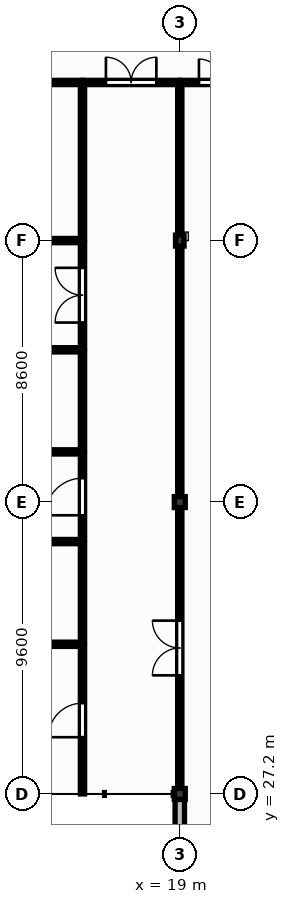
"""IFC4 building model, lengths in metres.
Left out: names, types, materials, properties, quantities, classifications, styles, units other than length and angle.
Written with IfcOpenShell. Run it as: python <this file> out.ifc"""

import sys

from ifc_helpers import new_model, si_unit, direction, frame, frame_2d, origin, origin_2d, place, context, subcontext, project, spatial, rectangle, extrude, element, fill, save


model = new_model("IFC4")
c1 = context("Model", 3, precision=1e-05, world=origin(), true_north=direction((0.0, 1.0)))
c2 = subcontext(c1, "Body", "Model", "MODEL_VIEW")
j1 = project(units=[si_unit("LENGTHUNIT", "METRE"), si_unit("PLANEANGLEUNIT", "RADIAN")], contexts=[c1])
p1 = place(None, origin())
s1 = spatial("IfcSite", under=j1, at=p1, CompositionType="ELEMENT")
p2 = place(p1, origin())
s2 = spatial("IfcBuilding", under=s1, at=p2, CompositionType="ELEMENT")
p3 = place(p2, frame((0.0, 0.0, 9.0)))
s3 = spatial("IfcBuildingStorey", under=s2, at=p3, CompositionType="ELEMENT", Elevation=9.0)
for number, where, z_axis, x_axis in (
    (1, (19.0, 27.2, 0.0), (0.0, 0.0, 1.0), (1.0, 0.0, 0.0)),
    (2, (19.0, 36.8, 0.0), (0.0, 0.0, 1.0), (1.0, 0.0, 0.0)),
):
    element("IfcColumn", number, at=place(p3, frame(where, z_axis=z_axis, x_axis=x_axis)), inside=s3, PredefinedType="COLUMN", context=c2, shape_type="SweptSolid", body=[
        extrude(rectangle(XDim=0.36, YDim=0.36, at=origin_2d()), origin(), (0.0, 0.0, 1.0), 3.95),
    ])
p4 = place(p3, frame((19.0, 45.4, 0.0), z_axis=(0.0, 0.0, 1.0), x_axis=(1.0, 0.0, 0.0)))
e3 = element("IfcColumn", 3, at=p4, inside=s3, PredefinedType="COLUMN", context=c2, shape_type="SweptSolid", body=[
    extrude(rectangle(XDim=0.28, YDim=0.36, at=origin_2d()), origin(), (0.0, 0.0, 1.0), 3.95),
])
p5 = place(p3, frame((19.0, 18.76, 0.0), z_axis=(0.0, 0.0, 1.0), x_axis=(0.0, 1.0, 0.0)))
e4 = element("IfcWall", 4, at=p5, inside=s3, PredefinedType="SOLIDWALL", context=c2, shape_type="SweptSolid", body=[
    extrude(rectangle(XDim=8.26, YDim=0.31, at=frame_2d((4.13, 0.0))), origin(), (0.0, 0.0, 1.0), 3.49),
])
p6 = place(p5, frame((2.54, 0.0, 1.35)))
e5 = element("IfcOpeningElement", 5, at=p6, cuts=e4, PredefinedType="OPENING", context=c2, shape_type="SweptSolid", body=[
    extrude(rectangle(XDim=1.25, YDim=1.4, at=frame_2d((0.625, 0.7))), frame((0.0, 0.165, 0.0), z_axis=(0.0, -1.0, 0.0), x_axis=(1.0, 0.0, 0.0)), (0.0, 0.0, 1.0), 0.33),
])
p7 = place(p5, frame((4.47, 0.0, 1.35)))
e6 = element("IfcOpeningElement", 6, at=p7, cuts=e4, PredefinedType="OPENING", context=c2, shape_type="SweptSolid", body=[
    extrude(rectangle(XDim=1.25, YDim=1.4, at=frame_2d((0.625, 0.7))), frame((0.0, 0.165, 0.0), z_axis=(0.0, -1.0, 0.0), x_axis=(1.0, 0.0, 0.0)), (0.0, 0.0, 1.0), 0.33),
])
p8 = place(p3, frame((11.8, 32.122, 0.0), z_axis=(0.0, 0.0, 1.0), x_axis=(1.0, 0.0, 0.0)))
e7 = element("IfcWall", 7, at=p8, inside=s3, PredefinedType="PARTITIONING", context=c2, shape_type="SweptSolid", body=[
    extrude(rectangle(XDim=4.0, YDim=0.14, at=frame_2d((2.0, 0.0))), origin(), (0.0, 0.0, 1.0), 3.96),
])
p9 = place(p3, frame((11.8, 35.5, 0.0), z_axis=(0.0, 0.0, 1.0), x_axis=(1.0, 0.0, 0.0)))
e8 = element("IfcWall", 8, at=p9, inside=s3, PredefinedType="PARTITIONING", context=c2, shape_type="SweptSolid", body=[
    extrude(rectangle(XDim=4.0, YDim=0.14, at=frame_2d((2.0, 0.0))), origin(), (0.0, 0.0, 1.0), 3.96),
])
p10 = place(p9, frame((1.54, 0.0, 0.0)))
e9 = element("IfcOpeningElement", 9, at=p10, cuts=e8, PredefinedType="OPENING", context=c2, shape_type="SweptSolid", body=[
    extrude(rectangle(XDim=0.92, YDim=2.1, at=frame_2d((0.46, 1.05))), frame((0.0, 0.08, 0.0), z_axis=(0.0, -1.0, 0.0), x_axis=(1.0, 0.0, 0.0)), (0.0, 0.0, 1.0), 0.16),
])
p11 = place(p3, frame((11.8, 38.45, 0.0), z_axis=(0.0, 0.0, 1.0), x_axis=(1.0, 0.0, 0.0)))
e10 = element("IfcWall", 10, at=p11, inside=s3, PredefinedType="PARTITIONING", context=c2, shape_type="SweptSolid", body=[
    extrude(rectangle(XDim=4.0, YDim=0.14, at=frame_2d((2.0, 0.0))), origin(), (0.0, 0.0, 1.0), 3.96),
])
p12 = place(p11, frame((1.42, 0.0, 0.0)))
e11 = element("IfcOpeningElement", 11, at=p12, cuts=e10, PredefinedType="OPENING", context=c2, shape_type="SweptSolid", body=[
    extrude(rectangle(XDim=1.16, YDim=2.1, at=frame_2d((0.58, 1.05))), frame((0.0, 0.08, 0.0), z_axis=(0.0, -1.0, 0.0), x_axis=(1.0, 0.0, 0.0)), (0.0, 0.0, 1.0), 0.16),
])
p13 = place(p3, frame((11.8, 41.807, 0.0), z_axis=(0.0, 0.0, 1.0), x_axis=(1.0, 0.0, 0.0)))
e12 = element("IfcWall", 12, at=p13, inside=s3, PredefinedType="PARTITIONING", context=c2, shape_type="SweptSolid", body=[
    extrude(rectangle(XDim=4.0, YDim=0.14, at=frame_2d((2.0, 0.0))), origin(), (0.0, 0.0, 1.0), 3.96),
])
p14 = place(p3, frame((11.96, 45.4, 0.0), z_axis=(0.0, 0.0, 1.0), x_axis=(1.0, 0.0, 0.0)))
e13 = element("IfcWall", 13, at=p14, inside=s3, PredefinedType="PARTITIONING", context=c2, shape_type="SweptSolid", body=[
    extrude(rectangle(XDim=3.84, YDim=0.14, at=frame_2d((1.92, 0.0))), origin(), (0.0, 0.0, 1.0), 3.31),
])
p15 = place(p3, frame((11.8, 50.6, 0.0), z_axis=(0.0, 0.0, 1.0), x_axis=(1.0, 0.0, 0.0)))
e14 = element("IfcWall", 14, at=p15, inside=s3, PredefinedType="PARTITIONING", context=c2, shape_type="SweptSolid", body=[
    extrude(rectangle(XDim=4.0, YDim=0.14, at=frame_2d((2.0, 0.0))), origin(), (0.0, 0.0, 1.0), 3.96),
])
p16 = place(p15, frame((1.48, 0.0, 0.0)))
e15 = element("IfcOpeningElement", 15, at=p16, cuts=e14, PredefinedType="OPENING", context=c2, shape_type="SweptSolid", body=[
    extrude(rectangle(XDim=1.04, YDim=2.1, at=frame_2d((0.52, 1.05))), frame((0.0, 0.08, 0.0), z_axis=(0.0, -1.0, 0.0), x_axis=(1.0, 0.0, 0.0)), (0.0, 0.0, 1.0), 0.16),
])
p17 = place(p3, frame((15.8, 27.2, 0.0), z_axis=(0.0, 0.0, 1.0), x_axis=(0.0, 1.0, 0.0)))
e16 = element("IfcWall", 16, at=p17, inside=s3, PredefinedType="PARTITIONING", context=c2, shape_type="SweptSolid", body=[
    extrude(rectangle(XDim=4.852, YDim=0.14, at=frame_2d((2.426, 0.0))), origin(), (0.0, 0.0, 1.0), 3.96),
])
p18 = place(p17, frame((1.866, 0.0, 0.0)))
e17 = element("IfcOpeningElement", 17, at=p18, cuts=e16, PredefinedType="OPENING", context=c2, shape_type="SweptSolid", body=[
    extrude(rectangle(XDim=1.12, YDim=2.15, at=frame_2d((0.56, 1.075))), frame((0.0, 0.08, 0.0), z_axis=(0.0, -1.0, 0.0), x_axis=(1.0, 0.0, 0.0)), (0.0, 0.0, 1.0), 0.16),
])
p19 = place(p3, frame((15.8, 32.192, 0.0), z_axis=(0.0, 0.0, 1.0), x_axis=(0.0, 1.0, 0.0)))
e18 = element("IfcWall", 18, at=p19, inside=s3, PredefinedType="PARTITIONING", context=c2, shape_type="SweptSolid", body=[
    extrude(rectangle(XDim=3.238, YDim=0.14, at=frame_2d((1.619, 0.0))), origin(), (0.0, 0.0, 1.0), 3.96),
])
p20 = place(p3, frame((15.8, 35.57, 0.0), z_axis=(0.0, 0.0, 1.0), x_axis=(0.0, 1.0, 0.0)))
e19 = element("IfcWall", 19, at=p20, inside=s3, PredefinedType="PARTITIONING", context=c2, shape_type="SweptSolid", body=[
    extrude(rectangle(XDim=2.81, YDim=0.14, at=frame_2d((1.405, 0.0))), origin(), (0.0, 0.0, 1.0), 3.96),
])
p21 = place(p20, frame((0.795, 0.0, 0.0)))
e20 = element("IfcOpeningElement", 20, at=p21, cuts=e19, PredefinedType="OPENING", context=c2, shape_type="SweptSolid", body=[
    extrude(rectangle(XDim=1.22, YDim=2.1, at=frame_2d((0.61, 1.05))), frame((0.0, 0.08, 0.0), z_axis=(0.0, -1.0, 0.0), x_axis=(1.0, 0.0, 0.0)), (0.0, 0.0, 1.0), 0.16),
])
p22 = place(p3, frame((15.8, 38.52, 0.0), z_axis=(0.0, 0.0, 1.0), x_axis=(0.0, 1.0, 0.0)))
e21 = element("IfcWall", 21, at=p22, inside=s3, PredefinedType="PARTITIONING", context=c2, shape_type="SweptSolid", body=[
    extrude(rectangle(XDim=3.217, YDim=0.14, at=frame_2d((1.608, 0.0))), origin(), (0.0, 0.0, 1.0), 3.96),
])
p23 = place(p3, frame((15.8, 41.877, 0.0), z_axis=(0.0, 0.0, 1.0), x_axis=(0.0, 1.0, 0.0)))
e22 = element("IfcWall", 22, at=p23, inside=s3, PredefinedType="PARTITIONING", context=c2, shape_type="SweptSolid", body=[
    extrude(rectangle(XDim=3.453, YDim=0.14, at=frame_2d((1.727, 0.0))), origin(), (0.0, 0.0, 1.0), 3.96),
])
p24 = place(p23, frame((0.826, 0.0, 0.0)))
e23 = element("IfcOpeningElement", 23, at=p24, cuts=e22, PredefinedType="OPENING", context=c2, shape_type="SweptSolid", body=[
    extrude(rectangle(XDim=1.8, YDim=2.3, at=frame_2d((0.9, 1.15))), frame((0.0, 0.08, 0.0), z_axis=(0.0, -1.0, 0.0), x_axis=(1.0, 0.0, 0.0)), (0.0, 0.0, 1.0), 0.16),
])
p25 = place(p3, frame((15.8, 45.47, 0.0), z_axis=(0.0, 0.0, 1.0), x_axis=(0.0, 1.0, 0.0)))
e24 = element("IfcWall", 24, at=p25, inside=s3, PredefinedType="PARTITIONING", context=c2, shape_type="SweptSolid", body=[
    extrude(rectangle(XDim=5.06, YDim=0.14, at=frame_2d((2.53, 0.0))), origin(), (0.0, 0.0, 1.0), 3.96),
])
p26 = place(p3, frame((15.8, 50.6, 0.0), z_axis=(0.0, 0.0, 1.0), x_axis=(1.0, 0.0, 0.0)))
e25 = element("IfcWall", 25, at=p26, inside=s3, PredefinedType="PARTITIONING", context=c2, shape_type="SweptSolid", body=[
    extrude(rectangle(XDim=3.2, YDim=0.14, at=frame_2d((1.6, 0.0))), origin(), (0.0, 0.0, 1.0), 3.96),
])
p27 = place(p26, frame((0.77, 0.0, 0.0)))
e26 = element("IfcOpeningElement", 26, at=p27, cuts=e25, PredefinedType="OPENING", context=c2, shape_type="SweptSolid", body=[
    extrude(rectangle(XDim=1.66, YDim=2.3, at=frame_2d((0.83, 1.15))), frame((0.0, 0.08, 0.0), z_axis=(0.0, -1.0, 0.0), x_axis=(1.0, 0.0, 0.0)), (0.0, 0.0, 1.0), 0.16),
])
p28 = place(p3, frame((19.0, 27.38, 0.0), z_axis=(0.0, 0.0, 1.0), x_axis=(0.0, 1.0, 0.0)))
e27 = element("IfcWall", 27, at=p28, inside=s3, PredefinedType="PARTITIONING", context=c2, shape_type="SweptSolid", body=[
    extrude(rectangle(XDim=9.24, YDim=0.14, at=frame_2d((4.62, 0.0))), origin(), (0.0, 0.0, 1.0), 3.49),
])
p29 = place(p28, frame((3.72, 0.0, 0.0)))
e28 = element("IfcOpeningElement", 28, at=p29, cuts=e27, PredefinedType="OPENING", context=c2, shape_type="SweptSolid", body=[
    extrude(rectangle(XDim=1.8, YDim=2.3, at=frame_2d((0.9, 1.15))), frame((0.0, 0.08, 0.0), z_axis=(0.0, -1.0, 0.0), x_axis=(1.0, 0.0, 0.0)), (0.0, 0.0, 1.0), 0.16),
])
p30 = place(p3, frame((19.0, 36.98, 0.0), z_axis=(0.0, 0.0, 1.0), x_axis=(0.0, 1.0, 0.0)))
e29 = element("IfcWall", 29, at=p30, inside=s3, PredefinedType="PARTITIONING", context=c2, shape_type="SweptSolid", body=[
    extrude(rectangle(XDim=8.24, YDim=0.14, at=frame_2d((4.12, 0.0))), origin(), (0.0, 0.0, 1.0), 3.49),
])
p31 = place(p3, frame((19.0, 45.58, 0.0), z_axis=(0.0, 0.0, 1.0), x_axis=(0.0, 1.0, 0.0)))
e30 = element("IfcWall", 30, at=p31, inside=s3, PredefinedType="PARTITIONING", context=c2, shape_type="SweptSolid", body=[
    extrude(rectangle(XDim=4.95, YDim=0.14, at=frame_2d((2.475, 0.0))), origin(), (0.0, 0.0, 1.0), 3.43),
])
p32 = place(p3, frame((19.0, 50.6, 0.0), z_axis=(0.0, 0.0, 1.0), x_axis=(1.0, 0.0, 0.0)))
e31 = element("IfcWall", 31, at=p32, inside=s3, PredefinedType="PARTITIONING", context=c2, shape_type="SweptSolid", body=[
    extrude(rectangle(XDim=2.8, YDim=0.14, at=frame_2d((1.4, 0.0))), origin(), (0.0, 0.0, 1.0), 3.96),
])
p33 = place(p32, frame((0.63, 0.0, 0.0)))
e32 = element("IfcOpeningElement", 32, at=p33, cuts=e31, PredefinedType="OPENING", context=c2, shape_type="SweptSolid", body=[
    extrude(rectangle(XDim=1.54, YDim=2.25, at=frame_2d((0.77, 1.125))), frame((0.0, 0.08, 0.0), z_axis=(0.0, -1.0, 0.0), x_axis=(1.0, 0.0, 0.0)), (0.0, 0.0, 1.0), 0.16),
])
p34 = place(p27, origin())
e33 = element("IfcDoor", 33, at=p34, inside=s3, OperationType="DOUBLE_DOOR_SINGLE_SWING", PredefinedType="DOOR", context=c2, shape_type="SweptSolid", body=[
    extrude(rectangle(XDim=1.66, YDim=2.3, at=frame_2d((0.83, 1.15))), frame((0.0, 0.025, 0.0), z_axis=(0.0, -1.0, 0.0), x_axis=(1.0, 0.0, 0.0)), (0.0, 0.0, 1.0), 0.05),
])
fill(e26, e33)
p35 = place(p33, origin())
e34 = element("IfcDoor", 34, at=p35, inside=s3, OperationType="DOUBLE_DOOR_SINGLE_SWING", PredefinedType="DOOR", context=c2, shape_type="SweptSolid", body=[
    extrude(rectangle(XDim=1.54, YDim=2.25, at=frame_2d((0.77, 1.125))), frame((0.0, 0.025, 0.0), z_axis=(0.0, -1.0, 0.0), x_axis=(1.0, 0.0, 0.0)), (0.0, 0.0, 1.0), 0.05),
])
fill(e32, e34)
p36 = place(p21, origin())
e35 = element("IfcDoor", 35, at=p36, inside=s3, OperationType="SINGLE_SWING_LEFT", PredefinedType="DOOR", context=c2, shape_type="SweptSolid", body=[
    extrude(rectangle(XDim=1.22, YDim=2.1, at=frame_2d((0.61, 1.05))), frame((0.0, 0.025, 0.0), z_axis=(0.0, -1.0, 0.0), x_axis=(1.0, 0.0, 0.0)), (0.0, 0.0, 1.0), 0.05),
])
fill(e20, e35)
p37 = place(p29, origin())
e36 = element("IfcDoor", 36, at=p37, inside=s3, OperationType="DOUBLE_DOOR_SINGLE_SWING", PredefinedType="DOOR", context=c2, shape_type="SweptSolid", body=[
    extrude(rectangle(XDim=1.8, YDim=2.3, at=frame_2d((0.9, 1.15))), frame((0.0, 0.025, 0.0), z_axis=(0.0, -1.0, 0.0), x_axis=(1.0, 0.0, 0.0)), (0.0, 0.0, 1.0), 0.05),
])
fill(e28, e36)
p38 = place(p18, origin())
e37 = element("IfcDoor", 37, at=p38, inside=s3, OperationType="SINGLE_SWING_LEFT", PredefinedType="DOOR", context=c2, shape_type="SweptSolid", body=[
    extrude(rectangle(XDim=1.12, YDim=2.15, at=frame_2d((0.56, 1.075))), frame((0.0, 0.025, 0.0), z_axis=(0.0, -1.0, 0.0), x_axis=(1.0, 0.0, 0.0)), (0.0, 0.0, 1.0), 0.05),
])
fill(e17, e37)
p39 = place(p24, origin())
e38 = element("IfcDoor", 38, at=p39, inside=s3, OperationType="DOUBLE_DOOR_SINGLE_SWING", PredefinedType="DOOR", context=c2, shape_type="SweptSolid", body=[
    extrude(rectangle(XDim=1.8, YDim=2.3, at=frame_2d((0.9, 1.15))), frame((0.0, 0.025, 0.0), z_axis=(0.0, -1.0, 0.0), x_axis=(1.0, 0.0, 0.0)), (0.0, 0.0, 1.0), 0.05),
])
fill(e23, e38)
save(model, sys.argv[1])
